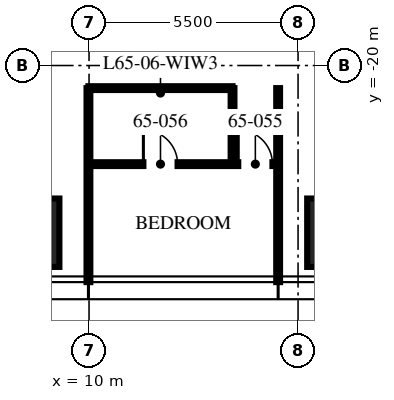
"""IFC4 building model, lengths in metres.
Left out: names, types, materials, properties, quantities, classifications, styles, units other than length and angle.
Written with IfcOpenShell. Run it as: python <this file> out.ifc"""

import sys

from ifc_helpers import new_model, si_unit, direction, frame, frame_2d, origin, origin_2d, place, context, subcontext, project, spatial, rectangle, extrude, element, fill, save


model = new_model("IFC4")
c1 = context("Model", 3, precision=1e-05, world=origin(), true_north=direction((0.0, 1.0)))
c2 = subcontext(c1, "Body", "Model", "MODEL_VIEW")
j1 = project(units=[si_unit("LENGTHUNIT", "METRE"), si_unit("PLANEANGLEUNIT", "RADIAN")], contexts=[c1])
p1 = place(None, origin())
s1 = spatial("IfcSite", under=j1, at=p1, CompositionType="ELEMENT")
p2 = place(p1, origin())
s2 = spatial("IfcBuilding", under=s1, at=p2, CompositionType="ELEMENT")
p3 = place(p2, frame((0.0, 0.0, 259.5)))
s3 = spatial("IfcBuildingStorey", under=s2, at=p3, CompositionType="ELEMENT", Elevation=259.5)
for number, where, z_axis, x_axis in (
    (1, (16.64, -24.4, 0.0), (0.0, 0.0, 1.0), (1.0, 0.0, 0.0)),
    (2, (8.32, -24.4, 0.0), (0.0, 0.0, 1.0), (1.0, 0.0, 0.0)),
):
    element("IfcColumn", number, at=place(p3, frame(where, z_axis=z_axis, x_axis=x_axis)), inside=s3, PredefinedType="COLUMN", context=c2, shape_type="SweptSolid", body=[
        extrude(rectangle(XDim=1.8, YDim=1.8, at=origin_2d()), origin(), (0.0, 0.0, 1.0), 3.75),
    ])
for number, where, z_axis, x_axis in (
    (3, (9.984, -20.595, 0.0), (0.0, 0.0, 1.0), (0.0, -1.0, 0.0)),
    (4, (14.976, -20.595, 0.0), (0.0, 0.0, 1.0), (0.0, -1.0, 0.0)),
):
    element("IfcWall", number, at=place(p3, frame(where, z_axis=z_axis, x_axis=x_axis)), inside=s3, PredefinedType="PARTITIONING", context=c2, shape_type="SweptSolid", body=[
        extrude(rectangle(XDim=5.105, YDim=0.1, at=frame_2d((2.552, 0.0))), origin(), (0.0, 0.0, 1.0), 2.91),
    ])
p4 = place(p3, frame((9.984, -22.595, 0.0), z_axis=(0.0, 0.0, 1.0), x_axis=(1.0, 0.0, 0.0)))
e5 = element("IfcWall", 5, at=p4, inside=s3, PredefinedType="PARTITIONING", context=c2, shape_type="SweptSolid", body=[
    extrude(rectangle(XDim=4.992, YDim=0.1, at=frame_2d((2.496, 0.0))), origin(), (0.0, 0.0, 1.0), 2.81),
])
p5 = place(p4, frame((3.942, 0.0, 0.0)))
e6 = element("IfcOpeningElement", 6, at=p5, cuts=e5, PredefinedType="OPENING", context=c2, shape_type="SweptSolid", body=[
    extrude(rectangle(XDim=0.9, YDim=2.1, at=frame_2d((0.45, 1.05))), frame((0.0, 0.06, 0.0), z_axis=(0.0, -1.0, 0.0), x_axis=(1.0, 0.0, 0.0)), (0.0, 0.0, 1.0), 0.12),
])
p6 = place(p4, frame((1.446, 0.0, 0.0)))
e7 = element("IfcOpeningElement", 7, at=p6, cuts=e5, PredefinedType="OPENING", context=c2, shape_type="SweptSolid", body=[
    extrude(rectangle(XDim=0.9, YDim=2.1, at=frame_2d((0.45, 1.05))), frame((0.0, 0.06, 0.0), z_axis=(0.0, -1.0, 0.0), x_axis=(1.0, 0.0, 0.0)), (0.0, 0.0, 1.0), 0.12),
])
p7 = place(p3, frame((13.776, -20.595, 0.0), z_axis=(0.0, 0.0, 1.0), x_axis=(0.0, -1.0, 0.0)))
e8 = element("IfcWall", 8, at=p7, inside=s3, PredefinedType="PARTITIONING", context=c2, shape_type="SweptSolid", body=[
    extrude(rectangle(XDim=2.0, YDim=0.1, at=frame_2d((1.0, 0.0))), origin(), (0.0, 0.0, 1.0), 3.5),
])
p8 = place(p3, frame((9.984, -20.595, 0.0), z_axis=(0.0, 0.0, 1.0), x_axis=(1.0, 0.0, 0.0)))
e9 = element("IfcWall", 9, at=p8, inside=s3, PredefinedType="PARTITIONING", context=c2, shape_type="SweptSolid", body=[
    extrude(rectangle(XDim=3.792, YDim=0.1, at=frame_2d((1.896, 0.0))), origin(), (0.0, 0.0, 1.0), 2.81),
])
p9 = place(p5, origin())
e10 = element("IfcDoor", 10, at=p9, inside=s3, OperationType="SINGLE_SWING_LEFT", PredefinedType="DOOR", context=c2, shape_type="SweptSolid", body=[
    extrude(rectangle(XDim=0.9, YDim=2.1, at=frame_2d((0.45, 1.05))), frame((0.0, 0.025, 0.0), z_axis=(0.0, -1.0, 0.0), x_axis=(1.0, 0.0, 0.0)), (0.0, 0.0, 1.0), 0.05),
])
fill(e6, e10)
p10 = place(p6, origin())
e11 = element("IfcDoor", 11, at=p10, inside=s3, OperationType="SINGLE_SWING_LEFT", PredefinedType="DOOR", context=c2, shape_type="SweptSolid", body=[
    extrude(rectangle(XDim=0.9, YDim=2.1, at=frame_2d((0.45, 1.05))), frame((0.0, 0.025, 0.0), z_axis=(0.0, -1.0, 0.0), x_axis=(1.0, 0.0, 0.0)), (0.0, 0.0, 1.0), 0.05),
])
fill(e7, e11)
save(model, sys.argv[1])
